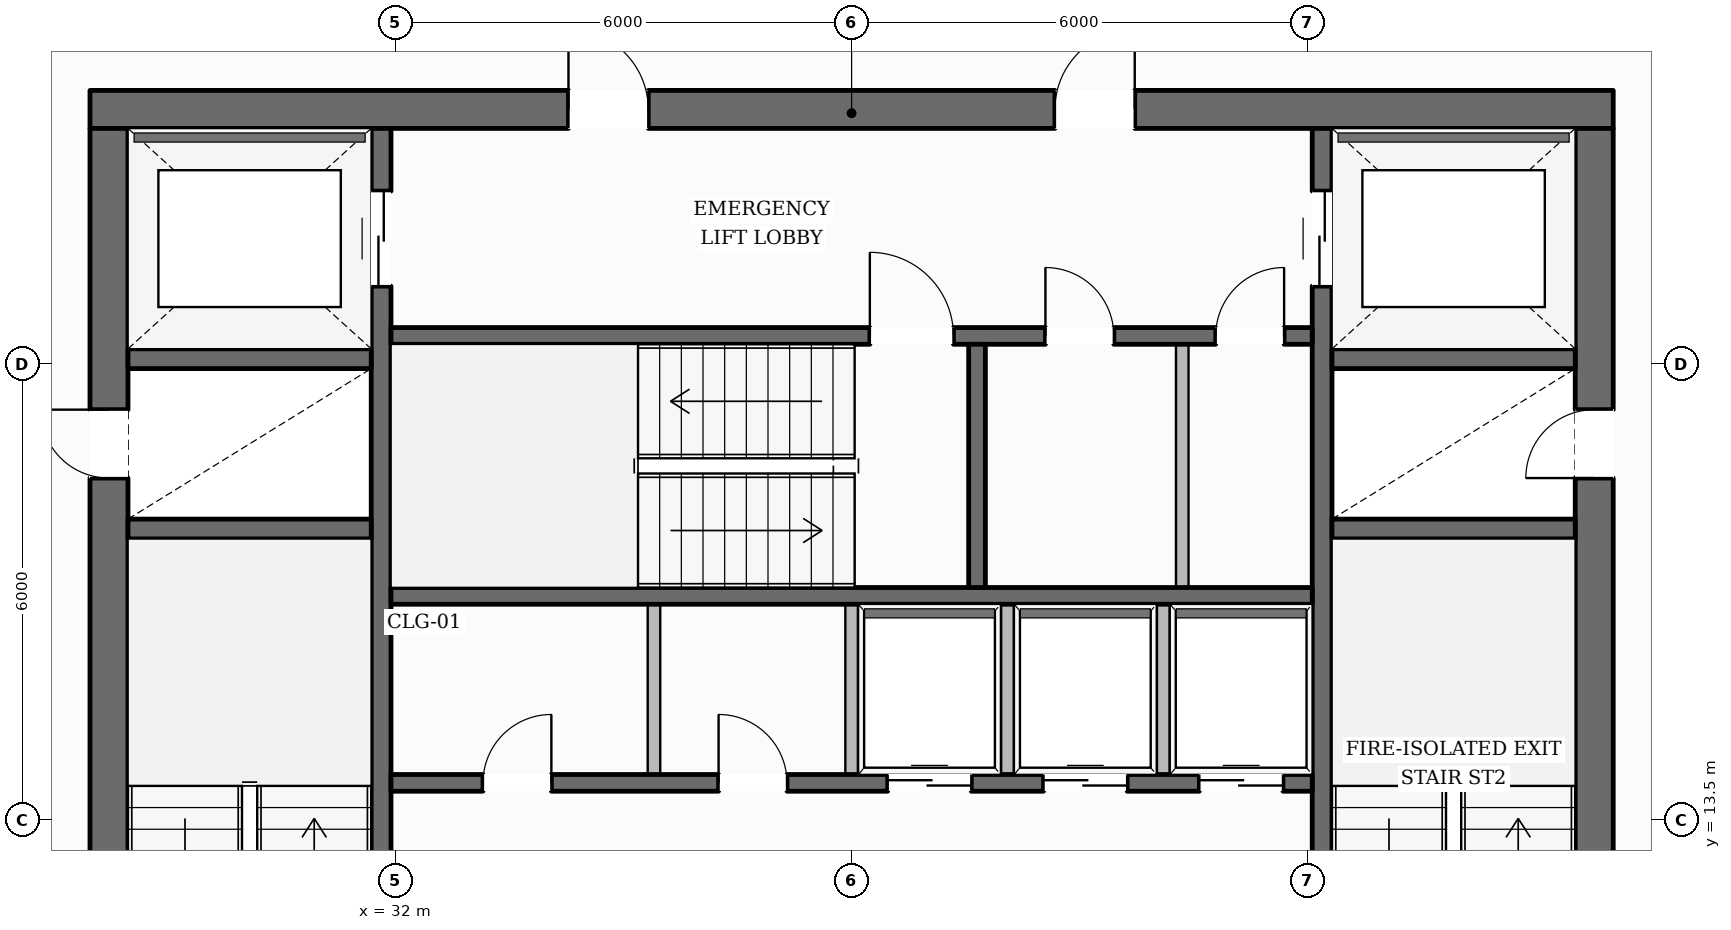
"""IFC4 building model, lengths in metres.
Left out: names, types, materials, properties, quantities, classifications, styles, units other than length and angle.
Written with IfcOpenShell. Run it as: python <this file> out.ifc"""

import sys

from ifc_helpers import new_model, si_unit, direction, frame, frame_2d, origin, place, context, subcontext, project, spatial, rectangle, extrude, element, fill, save


model = new_model("IFC4")
c1 = context("Model", 3, precision=1e-05, world=origin(), true_north=direction((0.0, 1.0)))
c2 = subcontext(c1, "Body", "Model", "MODEL_VIEW")
j1 = project(units=[si_unit("LENGTHUNIT", "METRE"), si_unit("PLANEANGLEUNIT", "RADIAN")], contexts=[c1])
p1 = place(None, origin())
s1 = spatial("IfcSite", under=j1, at=p1, CompositionType="ELEMENT")
p2 = place(p1, origin())
s2 = spatial("IfcBuilding", under=s1, at=p2, CompositionType="ELEMENT")
p3 = place(p2, frame((0.0, 0.0, 116.3)))
s3 = spatial("IfcBuildingStorey", under=s2, at=p3, CompositionType="ELEMENT", Elevation=116.3)
p4 = place(p3, frame((27.98, 22.85, 0.0), z_axis=(0.0, 0.0, 1.0), x_axis=(1.0, 0.0, 0.0)))
e1 = element("IfcWall", 1, at=p4, inside=s3, PredefinedType="SOLIDWALL", context=c2, shape_type="SweptSolid", body=[
    extrude(rectangle(XDim=20.04, YDim=0.5, at=frame_2d((10.02, 0.0))), origin(), (0.0, 0.0, 1.0), 3.6),
])
p5 = place(p4, frame((6.295, 0.0, 0.0)))
e2 = element("IfcOpeningElement", 2, at=p5, cuts=e1, PredefinedType="OPENING", context=c2, shape_type="SweptSolid", body=[
    extrude(rectangle(XDim=1.05, YDim=2.15, at=frame_2d((0.525, 1.075))), frame((0.0, 0.26, 0.0), z_axis=(0.0, -1.0, 0.0), x_axis=(1.0, 0.0, 0.0)), (0.0, 0.0, 1.0), 0.52),
])
p6 = place(p4, frame((12.695, 0.0, 0.0)))
e3 = element("IfcOpeningElement", 3, at=p6, cuts=e1, PredefinedType="OPENING", context=c2, shape_type="SweptSolid", body=[
    extrude(rectangle(XDim=1.05, YDim=2.15, at=frame_2d((0.525, 1.075))), frame((0.0, 0.26, 0.0), z_axis=(0.0, -1.0, 0.0), x_axis=(1.0, 0.0, 0.0)), (0.0, 0.0, 1.0), 0.52),
])
p7 = place(p3, frame((28.23, 9.6, 0.0), z_axis=(0.0, 0.0, 1.0), x_axis=(0.0, 1.0, 0.0)))
e4 = element("IfcWall", 4, at=p7, inside=s3, PredefinedType="SOLIDWALL", context=c2, shape_type="SweptSolid", body=[
    extrude(rectangle(XDim=13.0, YDim=0.5, at=frame_2d((6.5, 0.0))), origin(), (0.0, 0.0, 1.0), 3.6),
])
p8 = place(p7, frame((0.2, 0.0, 0.0)))
e5 = element("IfcOpeningElement", 5, at=p8, cuts=e4, PredefinedType="OPENING", context=c2, shape_type="SweptSolid", body=[
    extrude(rectangle(XDim=1.1, YDim=2.15, at=frame_2d((0.55, 1.075))), frame((0.0, 0.26, 0.0), z_axis=(0.0, -1.0, 0.0), x_axis=(1.0, 0.0, 0.0)), (0.0, 0.0, 1.0), 0.52),
])
p9 = place(p7, frame((8.4, 0.0, 0.0)))
e6 = element("IfcOpeningElement", 6, at=p9, cuts=e4, PredefinedType="OPENING", context=c2, shape_type="SweptSolid", body=[
    extrude(rectangle(XDim=0.9, YDim=2.1, at=frame_2d((0.45, 1.05))), frame((0.0, 0.26, 0.0), z_axis=(0.0, -1.0, 0.0), x_axis=(1.0, 0.0, 0.0)), (0.0, 0.0, 1.0), 0.52),
])
p10 = place(p3, frame((47.77, 9.6, 0.0), z_axis=(0.0, 0.0, 1.0), x_axis=(0.0, 1.0, 0.0)))
e7 = element("IfcWall", 7, at=p10, inside=s3, PredefinedType="SOLIDWALL", context=c2, shape_type="SweptSolid", body=[
    extrude(rectangle(XDim=13.0, YDim=0.5, at=frame_2d((6.5, 0.0))), origin(), (0.0, 0.0, 1.0), 3.6),
])
p11 = place(p10, frame((0.2, 0.0, 0.0)))
e8 = element("IfcOpeningElement", 8, at=p11, cuts=e7, PredefinedType="OPENING", context=c2, shape_type="SweptSolid", body=[
    extrude(rectangle(XDim=1.1, YDim=2.15, at=frame_2d((0.55, 1.075))), frame((0.0, 0.26, 0.0), z_axis=(0.0, -1.0, 0.0), x_axis=(1.0, 0.0, 0.0)), (0.0, 0.0, 1.0), 0.52),
])
p12 = place(p10, frame((8.4, 0.0, 0.0)))
e9 = element("IfcOpeningElement", 9, at=p12, cuts=e7, PredefinedType="OPENING", context=c2, shape_type="SweptSolid", body=[
    extrude(rectangle(XDim=0.9, YDim=2.1, at=frame_2d((0.45, 1.05))), frame((0.0, 0.26, 0.0), z_axis=(0.0, -1.0, 0.0), x_axis=(1.0, 0.0, 0.0)), (0.0, 0.0, 1.0), 0.52),
])
p13 = place(p3, frame((31.81, 9.6, 0.0), z_axis=(0.0, 0.0, 1.0), x_axis=(0.0, 1.0, 0.0)))
e10 = element("IfcWall", 10, at=p13, inside=s3, PredefinedType="SHEAR", context=c2, shape_type="SweptSolid", body=[
    extrude(rectangle(XDim=13.0, YDim=0.26, at=frame_2d((6.5, 0.0))), origin(), (0.0, 0.0, 1.0), 3.6),
])
p14 = place(p13, frame((10.925, 0.0, 0.0)))
e11 = element("IfcOpeningElement", 11, at=p14, cuts=e10, PredefinedType="OPENING", context=c2, shape_type="SweptSolid", body=[
    extrude(rectangle(XDim=1.25, YDim=2.25, at=frame_2d((0.625, 1.125))), frame((0.0, 0.14, 0.0), z_axis=(0.0, -1.0, 0.0), x_axis=(1.0, 0.0, 0.0)), (0.0, 0.0, 1.0), 0.28),
])
p15 = place(p3, frame((44.19, 9.6, 0.0), z_axis=(0.0, 0.0, 1.0), x_axis=(0.0, 1.0, 0.0)))
e12 = element("IfcWall", 12, at=p15, inside=s3, PredefinedType="SHEAR", context=c2, shape_type="SweptSolid", body=[
    extrude(rectangle(XDim=13.0, YDim=0.26, at=frame_2d((6.5, 0.0))), origin(), (0.0, 0.0, 1.0), 3.6),
])
p16 = place(p15, frame((10.925, 0.0, 0.0)))
e13 = element("IfcOpeningElement", 13, at=p16, cuts=e12, PredefinedType="OPENING", context=c2, shape_type="SweptSolid", body=[
    extrude(rectangle(XDim=1.25, YDim=2.25, at=frame_2d((0.625, 1.125))), frame((0.0, 0.14, 0.0), z_axis=(0.0, -1.0, 0.0), x_axis=(1.0, 0.0, 0.0)), (0.0, 0.0, 1.0), 0.28),
])
for number, where, z_axis, x_axis in (
    (14, (28.48, 17.33, 0.0), (0.0, 0.0, 1.0), (1.0, 0.0, 0.0)),
    (15, (28.48, 19.57, 0.0), (0.0, 0.0, 1.0), (1.0, 0.0, 0.0)),
    (16, (44.32, 17.33, 0.0), (0.0, 0.0, 1.0), (1.0, 0.0, 0.0)),
    (17, (44.32, 19.57, 0.0), (0.0, 0.0, 1.0), (1.0, 0.0, 0.0)),
):
    element("IfcWall", number, at=place(p3, frame(where, z_axis=z_axis, x_axis=x_axis)), inside=s3, PredefinedType="SHEAR", context=c2, shape_type="SweptSolid", body=[
        extrude(rectangle(XDim=3.2, YDim=0.26, at=frame_2d((1.6, 0.0))), origin(), (0.0, 0.0, 1.0), 3.6),
    ])
p17 = place(p3, frame((31.94, 19.87, 0.0), z_axis=(0.0, 0.0, 1.0), x_axis=(1.0, 0.0, 0.0)))
e18 = element("IfcWall", 18, at=p17, inside=s3, PredefinedType="SOLIDWALL", context=c2, shape_type="SweptSolid", body=[
    extrude(rectangle(XDim=12.12, YDim=0.22, at=frame_2d((6.06, 0.0))), origin(), (0.0, 0.0, 1.0), 3.6),
])
p18 = place(p17, frame((6.3, 0.0, 0.0)))
e19 = element("IfcOpeningElement", 19, at=p18, cuts=e18, PredefinedType="OPENING", context=c2, shape_type="SweptSolid", body=[
    extrude(rectangle(XDim=1.1, YDim=2.15, at=frame_2d((0.55, 1.075))), frame((0.0, 0.12, 0.0), z_axis=(0.0, -1.0, 0.0), x_axis=(1.0, 0.0, 0.0)), (0.0, 0.0, 1.0), 0.24),
])
p19 = place(p17, frame((8.61, 0.0, 0.0)))
e20 = element("IfcOpeningElement", 20, at=p19, cuts=e18, PredefinedType="OPENING", context=c2, shape_type="SweptSolid", body=[
    extrude(rectangle(XDim=0.9, YDim=2.1, at=frame_2d((0.45, 1.05))), frame((0.0, 0.12, 0.0), z_axis=(0.0, -1.0, 0.0), x_axis=(1.0, 0.0, 0.0)), (0.0, 0.0, 1.0), 0.24),
])
p20 = place(p17, frame((10.85, 0.0, 0.0)))
e21 = element("IfcOpeningElement", 21, at=p20, cuts=e18, PredefinedType="OPENING", context=c2, shape_type="SweptSolid", body=[
    extrude(rectangle(XDim=0.9, YDim=2.1, at=frame_2d((0.45, 1.05))), frame((0.0, 0.12, 0.0), z_axis=(0.0, -1.0, 0.0), x_axis=(1.0, 0.0, 0.0)), (0.0, 0.0, 1.0), 0.24),
])
p21 = place(p3, frame((31.94, 16.45, 0.0), z_axis=(0.0, 0.0, 1.0), x_axis=(1.0, 0.0, 0.0)))
e22 = element("IfcWall", 22, at=p21, inside=s3, PredefinedType="SOLIDWALL", context=c2, shape_type="SweptSolid", body=[
    extrude(rectangle(XDim=12.12, YDim=0.22, at=frame_2d((6.06, 0.0))), origin(), (0.0, 0.0, 1.0), 3.6),
])
p22 = place(p3, frame((39.65, 16.56, 0.0), z_axis=(0.0, 0.0, 1.0), x_axis=(0.0, 1.0, 0.0)))
e23 = element("IfcWall", 23, at=p22, inside=s3, PredefinedType="SOLIDWALL", context=c2, shape_type="SweptSolid", body=[
    extrude(rectangle(XDim=3.2, YDim=0.22, at=frame_2d((1.6, 0.0))), origin(), (0.0, 0.0, 1.0), 3.6),
])
p23 = place(p3, frame((31.94, 13.99, 0.0), z_axis=(0.0, 0.0, 1.0), x_axis=(1.0, 0.0, 0.0)))
e24 = element("IfcWall", 24, at=p23, inside=s3, PredefinedType="SOLIDWALL", context=c2, shape_type="SweptSolid", body=[
    extrude(rectangle(XDim=12.12, YDim=0.22, at=frame_2d((6.06, 0.0))), origin(), (0.0, 0.0, 1.0), 3.6),
])
p24 = place(p23, frame((1.21, 0.0, 0.0)))
e25 = element("IfcOpeningElement", 25, at=p24, cuts=e24, PredefinedType="OPENING", context=c2, shape_type="SweptSolid", body=[
    extrude(rectangle(XDim=0.9, YDim=2.1, at=frame_2d((0.45, 1.05))), frame((0.0, 0.12, 0.0), z_axis=(0.0, -1.0, 0.0), x_axis=(1.0, 0.0, 0.0)), (0.0, 0.0, 1.0), 0.24),
])
p25 = place(p23, frame((4.31, 0.0, 0.0)))
e26 = element("IfcOpeningElement", 26, at=p25, cuts=e24, PredefinedType="OPENING", context=c2, shape_type="SweptSolid", body=[
    extrude(rectangle(XDim=0.9, YDim=2.1, at=frame_2d((0.45, 1.05))), frame((0.0, 0.12, 0.0), z_axis=(0.0, -1.0, 0.0), x_axis=(1.0, 0.0, 0.0)), (0.0, 0.0, 1.0), 0.24),
])
p26 = place(p23, frame((6.535, 0.0, 0.0)))
e27 = element("IfcOpeningElement", 27, at=p26, cuts=e24, PredefinedType="OPENING", context=c2, shape_type="SweptSolid", body=[
    extrude(rectangle(XDim=1.1, YDim=2.2, at=frame_2d((0.55, 1.1))), frame((0.0, 0.12, 0.0), z_axis=(0.0, -1.0, 0.0), x_axis=(1.0, 0.0, 0.0)), (0.0, 0.0, 1.0), 0.24),
])
p27 = place(p23, frame((8.585, 0.0, 0.0)))
e28 = element("IfcOpeningElement", 28, at=p27, cuts=e24, PredefinedType="OPENING", context=c2, shape_type="SweptSolid", body=[
    extrude(rectangle(XDim=1.1, YDim=2.2, at=frame_2d((0.55, 1.1))), frame((0.0, 0.12, 0.0), z_axis=(0.0, -1.0, 0.0), x_axis=(1.0, 0.0, 0.0)), (0.0, 0.0, 1.0), 0.24),
])
p28 = place(p23, frame((10.635, 0.0, 0.0)))
e29 = element("IfcOpeningElement", 29, at=p28, cuts=e24, PredefinedType="OPENING", context=c2, shape_type="SweptSolid", body=[
    extrude(rectangle(XDim=1.1, YDim=2.2, at=frame_2d((0.55, 1.1))), frame((0.0, 0.12, 0.0), z_axis=(0.0, -1.0, 0.0), x_axis=(1.0, 0.0, 0.0)), (0.0, 0.0, 1.0), 0.24),
])
p29 = place(p3, frame((14.08, 13.052, 0.0), z_axis=(0.0, 0.0, 1.0), x_axis=(0.496744930326, 0.867896580357, 0.0)))
e30 = element("IfcWall", 30, at=p29, inside=s3, PredefinedType="STANDARD", context=c2, shape_type="SweptSolid", body=[
    extrude(rectangle(XDim=36.351, YDim=0.38, at=frame_2d((18.175, 0.0))), origin(), (0.0, 0.0, 1.0), 3.059),
])
p30 = place(p29, frame((32.146, 0.0, 0.65)))
e31 = element("IfcOpeningElement", 31, at=p30, cuts=e30, PredefinedType="OPENING", context=c2, shape_type="SweptSolid", body=[
    extrude(rectangle(XDim=1.55, YDim=1.75, at=frame_2d((0.775, 0.875))), frame((0.0, 0.2, 0.0), z_axis=(0.0, -1.0, 0.0), x_axis=(1.0, 0.0, 0.0)), (0.0, 0.0, 1.0), 0.4),
])
p31 = place(p29, frame((26.247, 0.0, 0.65)))
e32 = element("IfcOpeningElement", 32, at=p31, cuts=e30, PredefinedType="OPENING", context=c2, shape_type="SweptSolid", body=[
    extrude(rectangle(XDim=1.55, YDim=1.75, at=frame_2d((0.775, 0.875))), frame((0.0, 0.2, 0.0), z_axis=(0.0, -1.0, 0.0), x_axis=(1.0, 0.0, 0.0)), (0.0, 0.0, 1.0), 0.4),
])
p32 = place(p29, frame((14.449, 0.0, 0.65)))
e33 = element("IfcOpeningElement", 33, at=p32, cuts=e30, PredefinedType="OPENING", context=c2, shape_type="SweptSolid", body=[
    extrude(rectangle(XDim=1.55, YDim=1.75, at=frame_2d((0.775, 0.875))), frame((0.0, 0.2, 0.0), z_axis=(0.0, -1.0, 0.0), x_axis=(1.0, 0.0, 0.0)), (0.0, 0.0, 1.0), 0.4),
])
p33 = place(p29, frame((8.55, 0.0, 0.65)))
e34 = element("IfcOpeningElement", 34, at=p33, cuts=e30, PredefinedType="OPENING", context=c2, shape_type="SweptSolid", body=[
    extrude(rectangle(XDim=1.55, YDim=1.75, at=frame_2d((0.775, 0.875))), frame((0.0, 0.2, 0.0), z_axis=(0.0, -1.0, 0.0), x_axis=(1.0, 0.0, 0.0)), (0.0, 0.0, 1.0), 0.4),
])
p34 = place(p29, frame((2.652, 0.0, 0.65)))
e35 = element("IfcOpeningElement", 35, at=p34, cuts=e30, PredefinedType="OPENING", context=c2, shape_type="SweptSolid", body=[
    extrude(rectangle(XDim=1.55, YDim=1.75, at=frame_2d((0.775, 0.875))), frame((0.0, 0.2, 0.0), z_axis=(0.0, -1.0, 0.0), x_axis=(1.0, 0.0, 0.0)), (0.0, 0.0, 1.0), 0.4),
])
p35 = place(p3, frame((44.024, 44.506, 0.0), z_axis=(0.0, 0.0, 1.0), x_axis=(0.503202137133, -0.864168738838, 0.0)))
e36 = element("IfcWall", 36, at=p35, inside=s3, PredefinedType="STANDARD", context=c2, shape_type="SweptSolid", body=[
    extrude(rectangle(XDim=36.818, YDim=0.38, at=frame_2d((18.409, 0.0))), origin(), (0.0, 0.0, 1.0), 3.059),
])
p36 = place(p35, frame((32.577, 0.0, 0.65)))
e37 = element("IfcOpeningElement", 37, at=p36, cuts=e36, PredefinedType="OPENING", context=c2, shape_type="SweptSolid", body=[
    extrude(rectangle(XDim=1.55, YDim=1.75, at=frame_2d((0.775, 0.875))), frame((0.0, 0.2, 0.0), z_axis=(0.0, -1.0, 0.0), x_axis=(1.0, 0.0, 0.0)), (0.0, 0.0, 1.0), 0.4),
])
p37 = place(p35, frame((26.599, 0.0, 0.65)))
e38 = element("IfcOpeningElement", 38, at=p37, cuts=e36, PredefinedType="OPENING", context=c2, shape_type="SweptSolid", body=[
    extrude(rectangle(XDim=1.55, YDim=1.75, at=frame_2d((0.775, 0.875))), frame((0.0, 0.2, 0.0), z_axis=(0.0, -1.0, 0.0), x_axis=(1.0, 0.0, 0.0)), (0.0, 0.0, 1.0), 0.4),
])
p38 = place(p35, frame((14.643, 0.0, 0.65)))
e39 = element("IfcOpeningElement", 39, at=p38, cuts=e36, PredefinedType="OPENING", context=c2, shape_type="SweptSolid", body=[
    extrude(rectangle(XDim=1.55, YDim=1.75, at=frame_2d((0.775, 0.875))), frame((0.0, 0.2, 0.0), z_axis=(0.0, -1.0, 0.0), x_axis=(1.0, 0.0, 0.0)), (0.0, 0.0, 1.0), 0.4),
])
p39 = place(p35, frame((8.665, 0.0, 0.65)))
e40 = element("IfcOpeningElement", 40, at=p39, cuts=e36, PredefinedType="OPENING", context=c2, shape_type="SweptSolid", body=[
    extrude(rectangle(XDim=1.55, YDim=1.75, at=frame_2d((0.775, 0.875))), frame((0.0, 0.2, 0.0), z_axis=(0.0, -1.0, 0.0), x_axis=(1.0, 0.0, 0.0)), (0.0, 0.0, 1.0), 0.4),
])
p40 = place(p35, frame((2.688, 0.0, 0.65)))
e41 = element("IfcOpeningElement", 41, at=p40, cuts=e36, PredefinedType="OPENING", context=c2, shape_type="SweptSolid", body=[
    extrude(rectangle(XDim=1.55, YDim=1.75, at=frame_2d((0.775, 0.875))), frame((0.0, 0.2, 0.0), z_axis=(0.0, -1.0, 0.0), x_axis=(1.0, 0.0, 0.0)), (0.0, 0.0, 1.0), 0.4),
])
for number, where, z_axis, x_axis in (
    (42, (38.0, 14.1, 0.0), (0.0, 0.0, 1.0), (0.0, 1.0, 0.0)),
    (43, (35.4, 14.1, 0.0), (0.0, 0.0, 1.0), (0.0, 1.0, 0.0)),
    (44, (40.05, 14.1, 0.0), (0.0, 0.0, 1.0), (0.0, 1.0, 0.0)),
    (45, (42.1, 14.1, 0.0), (0.0, 0.0, 1.0), (0.0, 1.0, 0.0)),
):
    element("IfcWall", number, at=place(p3, frame(where, z_axis=z_axis, x_axis=x_axis)), inside=s3, PredefinedType="PARTITIONING", context=c2, shape_type="SweptSolid", body=[
        extrude(rectangle(XDim=2.24, YDim=0.165, at=frame_2d((1.12, 0.0))), origin(), (0.0, 0.0, 1.0), 3.6),
    ])
p41 = place(p3, frame((42.35, 16.56, 0.0), z_axis=(0.0, 0.0, 1.0), x_axis=(0.0, 1.0, 0.0)))
e46 = element("IfcWall", 46, at=p41, inside=s3, PredefinedType="PARTITIONING", context=c2, shape_type="SweptSolid", body=[
    extrude(rectangle(XDim=3.2, YDim=0.165, at=frame_2d((1.6, 0.0))), origin(), (0.0, 0.0, 1.0), 3.6),
])
p42 = place(p18, origin())
e47 = element("IfcDoor", 47, at=p42, inside=s3, OperationType="SINGLE_SWING_LEFT", PredefinedType="DOOR", context=c2, shape_type="SweptSolid", body=[
    extrude(rectangle(XDim=1.1, YDim=2.15, at=frame_2d((0.55, 1.075))), frame((0.0, 0.025, 0.0), z_axis=(0.0, -1.0, 0.0), x_axis=(1.0, 0.0, 0.0)), (0.0, 0.0, 1.0), 0.05),
])
fill(e19, e47)
p43 = place(p9, origin())
e48 = element("IfcDoor", 48, at=p43, inside=s3, OperationType="SINGLE_SWING_RIGHT", PredefinedType="DOOR", context=c2, shape_type="SweptSolid", body=[
    extrude(rectangle(XDim=0.9, YDim=2.1, at=frame_2d((0.45, 1.05))), frame((0.0, 0.025, 0.0), z_axis=(0.0, -1.0, 0.0), x_axis=(1.0, 0.0, 0.0)), (0.0, 0.0, 1.0), 0.05),
])
fill(e6, e48)
p44 = place(p12, origin())
e49 = element("IfcDoor", 49, at=p44, inside=s3, OperationType="SINGLE_SWING_LEFT", PredefinedType="DOOR", context=c2, shape_type="SweptSolid", body=[
    extrude(rectangle(XDim=0.9, YDim=2.1, at=frame_2d((0.45, 1.05))), frame((0.0, 0.025, 0.0), z_axis=(0.0, -1.0, 0.0), x_axis=(1.0, 0.0, 0.0)), (0.0, 0.0, 1.0), 0.05),
])
fill(e9, e49)
p45 = place(p5, origin())
e50 = element("IfcDoor", 50, at=p45, inside=s3, OperationType="SINGLE_SWING_LEFT", PredefinedType="DOOR", context=c2, shape_type="SweptSolid", body=[
    extrude(rectangle(XDim=1.05, YDim=2.15, at=frame_2d((0.525, 1.075))), frame((0.0, 0.025, 0.0), z_axis=(0.0, -1.0, 0.0), x_axis=(1.0, 0.0, 0.0)), (0.0, 0.0, 1.0), 0.05),
])
fill(e2, e50)
p46 = place(p6, origin())
e51 = element("IfcDoor", 51, at=p46, inside=s3, OperationType="SINGLE_SWING_RIGHT", PredefinedType="DOOR", context=c2, shape_type="SweptSolid", body=[
    extrude(rectangle(XDim=1.05, YDim=2.15, at=frame_2d((0.525, 1.075))), frame((0.0, 0.025, 0.0), z_axis=(0.0, -1.0, 0.0), x_axis=(1.0, 0.0, 0.0)), (0.0, 0.0, 1.0), 0.05),
])
fill(e3, e51)
p47 = place(p14, origin())
e52 = element("IfcDoor", 52, at=p47, inside=s3, OperationType="DOUBLE_DOOR_SLIDING", PredefinedType="DOOR", context=c2, shape_type="SweptSolid", body=[
    extrude(rectangle(XDim=1.25, YDim=2.25, at=frame_2d((0.625, 1.125))), frame((0.0, 0.025, 0.0), z_axis=(0.0, -1.0, 0.0), x_axis=(1.0, 0.0, 0.0)), (0.0, 0.0, 1.0), 0.05),
])
fill(e11, e52)
p48 = place(p16, origin())
e53 = element("IfcDoor", 53, at=p48, inside=s3, OperationType="DOUBLE_DOOR_SLIDING", PredefinedType="DOOR", context=c2, shape_type="SweptSolid", body=[
    extrude(rectangle(XDim=1.25, YDim=2.25, at=frame_2d((0.625, 1.125))), frame((0.0, 0.025, 0.0), z_axis=(0.0, -1.0, 0.0), x_axis=(1.0, 0.0, 0.0)), (0.0, 0.0, 1.0), 0.05),
])
fill(e13, e53)
p49 = place(p24, origin())
e54 = element("IfcDoor", 54, at=p49, inside=s3, OperationType="SINGLE_SWING_RIGHT", PredefinedType="DOOR", context=c2, shape_type="SweptSolid", body=[
    extrude(rectangle(XDim=0.9, YDim=2.1, at=frame_2d((0.45, 1.05))), frame((0.0, 0.025, 0.0), z_axis=(0.0, -1.0, 0.0), x_axis=(1.0, 0.0, 0.0)), (0.0, 0.0, 1.0), 0.05),
])
fill(e25, e54)
p50 = place(p25, origin())
e55 = element("IfcDoor", 55, at=p50, inside=s3, OperationType="SINGLE_SWING_LEFT", PredefinedType="DOOR", context=c2, shape_type="SweptSolid", body=[
    extrude(rectangle(XDim=0.9, YDim=2.1, at=frame_2d((0.45, 1.05))), frame((0.0, 0.025, 0.0), z_axis=(0.0, -1.0, 0.0), x_axis=(1.0, 0.0, 0.0)), (0.0, 0.0, 1.0), 0.05),
])
fill(e26, e55)
p51 = place(p26, origin())
e56 = element("IfcDoor", 56, at=p51, inside=s3, OperationType="DOUBLE_DOOR_SLIDING", PredefinedType="DOOR", context=c2, shape_type="SweptSolid", body=[
    extrude(rectangle(XDim=1.1, YDim=2.2, at=frame_2d((0.55, 1.1))), frame((0.0, 0.025, 0.0), z_axis=(0.0, -1.0, 0.0), x_axis=(1.0, 0.0, 0.0)), (0.0, 0.0, 1.0), 0.05),
])
fill(e27, e56)
p52 = place(p27, origin())
e57 = element("IfcDoor", 57, at=p52, inside=s3, OperationType="DOUBLE_DOOR_SLIDING", PredefinedType="DOOR", context=c2, shape_type="SweptSolid", body=[
    extrude(rectangle(XDim=1.1, YDim=2.2, at=frame_2d((0.55, 1.1))), frame((0.0, 0.025, 0.0), z_axis=(0.0, -1.0, 0.0), x_axis=(1.0, 0.0, 0.0)), (0.0, 0.0, 1.0), 0.05),
])
fill(e28, e57)
p53 = place(p28, origin())
e58 = element("IfcDoor", 58, at=p53, inside=s3, OperationType="DOUBLE_DOOR_SLIDING", PredefinedType="DOOR", context=c2, shape_type="SweptSolid", body=[
    extrude(rectangle(XDim=1.1, YDim=2.2, at=frame_2d((0.55, 1.1))), frame((0.0, 0.025, 0.0), z_axis=(0.0, -1.0, 0.0), x_axis=(1.0, 0.0, 0.0)), (0.0, 0.0, 1.0), 0.05),
])
fill(e29, e58)
p54 = place(p19, origin())
e59 = element("IfcDoor", 59, at=p54, inside=s3, OperationType="SINGLE_SWING_LEFT", PredefinedType="DOOR", context=c2, shape_type="SweptSolid", body=[
    extrude(rectangle(XDim=0.9, YDim=2.1, at=frame_2d((0.45, 1.05))), frame((0.0, 0.025, 0.0), z_axis=(0.0, -1.0, 0.0), x_axis=(1.0, 0.0, 0.0)), (0.0, 0.0, 1.0), 0.05),
])
fill(e20, e59)
p55 = place(p20, origin())
e60 = element("IfcDoor", 60, at=p55, inside=s3, OperationType="SINGLE_SWING_RIGHT", PredefinedType="DOOR", context=c2, shape_type="SweptSolid", body=[
    extrude(rectangle(XDim=0.9, YDim=2.1, at=frame_2d((0.45, 1.05))), frame((0.0, 0.025, 0.0), z_axis=(0.0, -1.0, 0.0), x_axis=(1.0, 0.0, 0.0)), (0.0, 0.0, 1.0), 0.05),
])
fill(e21, e60)
save(model, sys.argv[1])
